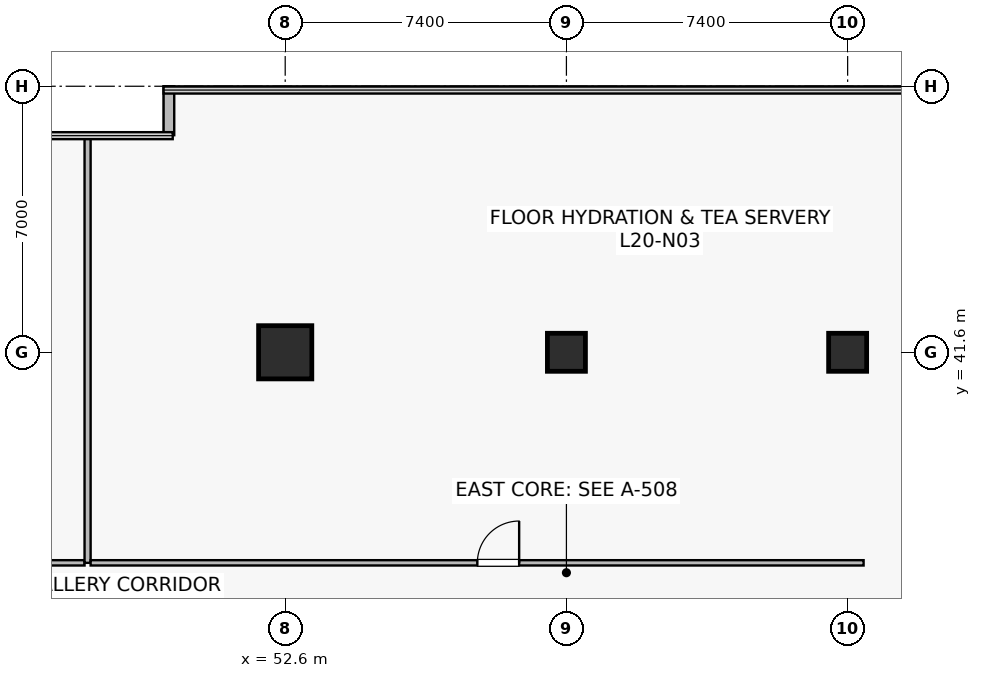
"""IFC4 building model, lengths in metres.
Left out: names, types, materials, properties, quantities, classifications, styles, units other than length and angle.
Written with IfcOpenShell. Run it as: python <this file> out.ifc"""

import sys

from ifc_helpers import new_model, si_unit, direction, frame, frame_2d, origin, origin_2d, place, context, subcontext, project, spatial, rectangle, extrude, source, transform, mapped, element, fill, save


model = new_model("IFC4")
c1 = context("Model", 3, precision=1e-05, world=origin(), true_north=direction((0.0, 1.0)))
c2 = subcontext(c1, "Body", "Model", "MODEL_VIEW")
j1 = project(units=[si_unit("LENGTHUNIT", "METRE"), si_unit("PLANEANGLEUNIT", "RADIAN")], contexts=[c1])
p1 = place(None, origin())
s1 = spatial("IfcSite", under=j1, at=p1, CompositionType="ELEMENT")
p2 = place(p1, origin())
s2 = spatial("IfcBuilding", under=s1, at=p2, CompositionType="ELEMENT")
p3 = place(p2, frame((0.0, 0.0, 82.6)))
s3 = spatial("IfcBuildingStorey", under=s2, at=p3, CompositionType="ELEMENT", Elevation=82.6)
m1 = source(origin(), c2, "Body", "SweptSolid", [
    extrude(rectangle(XDim=1.4, YDim=1.4, at=origin_2d()), origin(), (0.0, 0.0, 1.0), 4.1),
])
p4 = place(p3, frame((52.6, 41.6, 0.0), z_axis=(0.0, 0.0, 1.0), x_axis=(1.0, 0.0, 0.0)))
e1 = element("IfcColumn", 1, at=p4, inside=s3, PredefinedType="COLUMN", context=c2, shape_type="MappedRepresentation", body=[
    mapped(m1, transform((0.0, 0.0, 0.0), scale=1.0)),
])
m2 = source(origin(), c2, "Body", "SweptSolid", [
    extrude(rectangle(XDim=1.0, YDim=1.0, at=origin_2d()), origin(), (0.0, 0.0, 1.0), 4.1),
])
for number, where, z_axis, x_axis in (
    (2, (60.0, 41.6, 0.0), (0.0, 0.0, 1.0), (1.0, 0.0, 0.0)),
    (3, (67.4, 41.6, 0.0), (0.0, 0.0, 1.0), (1.0, 0.0, 0.0)),
):
    element("IfcColumn", number, at=place(p3, frame(where, z_axis=z_axis, x_axis=x_axis)), inside=s3, PredefinedType="COLUMN", context=c2, shape_type="MappedRepresentation", body=[
        mapped(m2, transform((0.0, 0.0, 0.0), scale=1.0)),
    ])
p5 = place(p3, frame((49.54, 48.6, 0.0), z_axis=(0.0, 0.0, 1.0), x_axis=(0.0, -1.0, 0.0)))
e4 = element("IfcWall", 4, at=p5, inside=s3, PredefinedType="STANDARD", context=c2, shape_type="SweptSolid", body=[
    extrude(rectangle(XDim=1.288, YDim=0.28, at=frame_2d((0.644, 0.0))), origin(), (0.0, 0.0, 1.0), 3.78),
])
p6 = place(p3, frame((23.68, 36.06, 0.0), z_axis=(0.0, 0.0, 1.0), x_axis=(1.0, 0.0, 0.0)))
e5 = element("IfcWall", 5, at=p6, inside=s3, PredefinedType="PARTITIONING", context=c2, shape_type="SweptSolid", body=[
    extrude(rectangle(XDim=23.64, YDim=0.14, at=frame_2d((11.82, 0.0))), origin(), (0.0, 0.0, 1.0), 3.115),
])
p7 = place(p6, frame((9.304, 0.0, 0.0)))
e6 = element("IfcOpeningElement", 6, at=p7, cuts=e5, PredefinedType="OPENING", context=c2, shape_type="SweptSolid", body=[
    extrude(rectangle(XDim=1.1, YDim=2.18, at=frame_2d((0.55, 1.09))), frame((0.0, 0.08, 0.0), z_axis=(0.0, -1.0, 0.0), x_axis=(1.0, 0.0, 0.0)), (0.0, 0.0, 1.0), 0.16),
])
p8 = place(p3, frame((47.4, 36.06, 0.0), z_axis=(0.0, 0.0, 1.0), x_axis=(0.0, 1.0, 0.0)))
e7 = element("IfcWall", 7, at=p8, inside=s3, PredefinedType="PARTITIONING", context=c2, shape_type="SweptSolid", body=[
    extrude(rectangle(XDim=11.23, YDim=0.16, at=frame_2d((5.615, 0.0))), origin(), (0.0, 0.0, 1.0), 3.015),
])
p9 = place(p3, frame((47.48, 36.06, 0.0), z_axis=(0.0, 0.0, 1.0), x_axis=(1.0, 0.0, 0.0)))
e8 = element("IfcWall", 8, at=p9, inside=s3, PredefinedType="PARTITIONING", context=c2, shape_type="SweptSolid", body=[
    extrude(rectangle(XDim=20.34, YDim=0.14, at=frame_2d((10.17, 0.0))), origin(), (0.0, 0.0, 1.0), 3.115),
])
p10 = place(p9, frame((10.176, 0.0, 0.0)))
e9 = element("IfcOpeningElement", 9, at=p10, cuts=e8, PredefinedType="OPENING", context=c2, shape_type="SweptSolid", body=[
    extrude(rectangle(XDim=1.1, YDim=2.18, at=frame_2d((0.55, 1.09))), frame((0.0, 0.08, 0.0), z_axis=(0.0, -1.0, 0.0), x_axis=(1.0, 0.0, 0.0)), (0.0, 0.0, 1.0), 0.16),
])
m3 = source(origin(), c2, "Body", "SweptSolid", [
    extrude(rectangle(XDim=1.1, YDim=2.18, at=frame_2d((0.55, 1.09))), frame((0.0, 0.025, 0.0), z_axis=(0.0, -1.0, 0.0), x_axis=(1.0, 0.0, 0.0)), (0.0, 0.0, 1.0), 0.05),
])
p11 = place(p10, origin())
e10 = element("IfcDoor", 10, at=p11, inside=s3, OperationType="SINGLE_SWING_RIGHT", PredefinedType="DOOR", context=c2, shape_type="MappedRepresentation", body=[
    mapped(m3, transform((0.0, 0.0, 0.0), scale=1.0)),
])
fill(e9, e10)
save(model, sys.argv[1])
